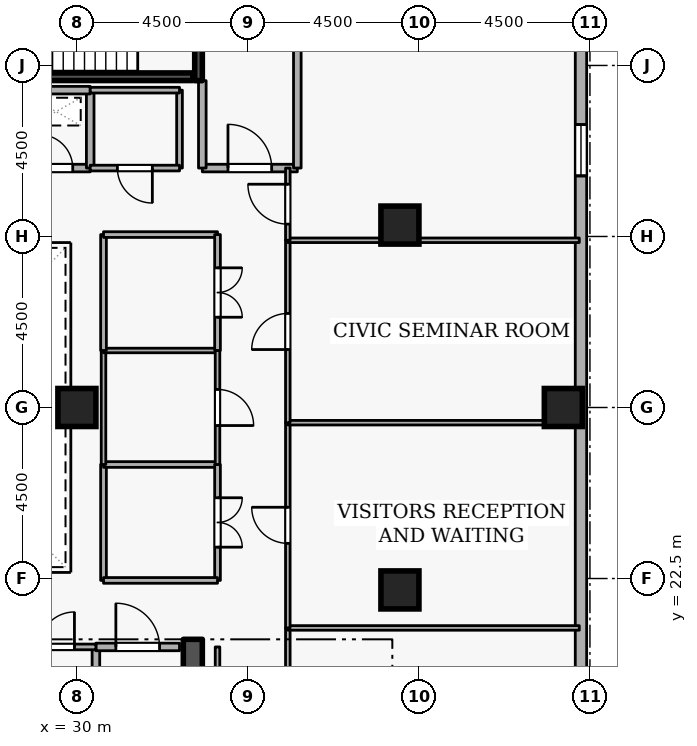
"""IFC4 building model, lengths in metres.
Left out: names, types, materials, properties, quantities, classifications, styles, units other than length and angle.
Written with IfcOpenShell. Run it as: python <this file> out.ifc"""

import sys

from ifc_helpers import new_model, si_unit, direction, frame, frame_2d, origin, origin_2d, place, context, subcontext, project, spatial, rectangle, extrude, element, fill, save


model = new_model("IFC4")
c1 = context("Model", 3, precision=1e-05, world=origin(), true_north=direction((0.0, 1.0)))
c2 = subcontext(c1, "Body", "Model", "MODEL_VIEW")
j1 = project(units=[si_unit("LENGTHUNIT", "METRE"), si_unit("PLANEANGLEUNIT", "RADIAN")], contexts=[c1])
p1 = place(None, origin())
s1 = spatial("IfcSite", under=j1, at=p1, CompositionType="ELEMENT")
p2 = place(p1, origin())
s2 = spatial("IfcBuilding", under=s1, at=p2, CompositionType="ELEMENT")
p3 = place(p2, frame((0.0, 0.0, 218.1)))
s3 = spatial("IfcBuildingStorey", under=s2, at=p3, CompositionType="ELEMENT", Elevation=218.1)
p4 = place(p3, frame((33.05, 15.1, 0.0), z_axis=(0.0, 0.0, 1.0), x_axis=(0.0, 1.0, 0.0)))
e1 = element("IfcWall", 1, at=p4, inside=s3, PredefinedType="SHEAR", context=c2, shape_type="SweptSolid", body=[
    extrude(rectangle(XDim=5.8, YDim=0.5, at=frame_2d((2.9, 0.0))), origin(), (0.0, 0.0, 1.0), 3.6),
])
for number, where, z_axis, x_axis in (
    (2, (42.8, 27.0, 0.0), (0.0, 0.0, 1.0), (1.0, 0.0, 0.0)),
    (3, (38.5, 22.2, 0.0), (0.0, 0.0, 1.0), (1.0, 0.0, 0.0)),
    (4, (38.5, 31.8, 0.0), (0.0, 0.0, 1.0), (1.0, 0.0, 0.0)),
    (5, (30.0, 27.0, 0.0), (0.0, 0.0, 1.0), (1.0, 0.0, 0.0)),
):
    element("IfcColumn", number, at=place(p3, frame(where, z_axis=z_axis, x_axis=x_axis)), inside=s3, PredefinedType="COLUMN", context=c2, shape_type="SweptSolid", body=[
        extrude(rectangle(XDim=1.0, YDim=1.0, at=origin_2d()), origin(), (0.0, 0.0, 1.0), 3.6),
    ])
p5 = place(p3, frame((43.264, 12.094, 0.0), z_axis=(0.0, 0.0, 1.0), x_axis=(2.7061402e-05, 0.999999999634, 0.0)))
e6 = element("IfcWall", 6, at=p5, inside=s3, PredefinedType="STANDARD", context=c2, shape_type="SweptSolid", body=[
    extrude(rectangle(XDim=36.087, YDim=0.3, at=frame_2d((18.043, 0.0))), origin(), (0.0, 0.0, 1.0), 2.66),
])
p6 = place(p5, frame((6.6, 0.0, 0.72)))
e7 = element("IfcOpeningElement", 7, at=p6, cuts=e6, PredefinedType="OPENING", context=c2, shape_type="SweptSolid", body=[
    extrude(rectangle(XDim=1.35, YDim=1.05, at=frame_2d((0.675, 0.525))), frame((0.0, 0.16, 0.0), z_axis=(0.0, -1.0, 0.0), x_axis=(1.0, 0.0, 0.0)), (0.0, 0.0, 1.0), 0.32),
])
p7 = place(p5, frame((21.0, 0.0, 0.72)))
e8 = element("IfcOpeningElement", 8, at=p7, cuts=e6, PredefinedType="OPENING", context=c2, shape_type="SweptSolid", body=[
    extrude(rectangle(XDim=1.35, YDim=1.05, at=frame_2d((0.675, 0.525))), frame((0.0, 0.16, 0.0), z_axis=(0.0, -1.0, 0.0), x_axis=(1.0, 0.0, 0.0)), (0.0, 0.0, 1.0), 0.32),
])
p8 = place(p5, frame((30.6, 0.0, 0.72)))
e9 = element("IfcOpeningElement", 9, at=p8, cuts=e6, PredefinedType="OPENING", context=c2, shape_type="SweptSolid", body=[
    extrude(rectangle(XDim=1.35, YDim=1.05, at=frame_2d((0.675, 0.525))), frame((0.0, 0.16, 0.0), z_axis=(0.0, -1.0, 0.0), x_axis=(1.0, 0.0, 0.0)), (0.0, 0.0, 1.0), 0.32),
])
p9 = place(p3, frame((33.2, 38.95, 0.0), z_axis=(0.0, 0.0, 1.0), x_axis=(0.0, -1.0, 0.0)))
e10 = element("IfcWall", 10, at=p9, inside=s3, PredefinedType="SHEAR", context=c2, shape_type="SweptSolid", body=[
    extrude(rectangle(XDim=3.35, YDim=0.2, at=frame_2d((1.675, 0.0))), origin(), (0.0, 0.0, 1.0), 3.6),
])
p10 = place(p9, frame((1.125, 0.0, 0.0)))
e11 = element("IfcOpeningElement", 11, at=p10, cuts=e10, PredefinedType="OPENING", context=c2, shape_type="SweptSolid", body=[
    extrude(rectangle(XDim=1.1, YDim=2.1, at=frame_2d((0.55, 1.05))), frame((0.0, 0.11, 0.0), z_axis=(0.0, -1.0, 0.0), x_axis=(1.0, 0.0, 0.0)), (0.0, 0.0, 1.0), 0.22),
])
p11 = place(p3, frame((25.95, 35.703, 0.0), z_axis=(0.0, 0.0, 1.0), x_axis=(1.0, 0.0, 0.0)))
e12 = element("IfcWall", 12, at=p11, inside=s3, PredefinedType="SHEAR", context=c2, shape_type="SweptSolid", body=[
    extrude(rectangle(XDim=7.1, YDim=0.2, at=frame_2d((3.55, 0.0))), origin(), (0.0, 0.0, 1.0), 3.6),
])
p12 = place(p3, frame((33.3, 33.3, 0.0), z_axis=(0.0, 0.0, 1.0), x_axis=(1.0, 0.0, 0.0)))
e13 = element("IfcWall", 13, at=p12, inside=s3, PredefinedType="STANDARD", context=c2, shape_type="SweptSolid", body=[
    extrude(rectangle(XDim=2.5, YDim=0.2, at=frame_2d((1.25, 0.0))), origin(), (0.0, 0.0, 1.0), 3.26),
])
p13 = place(p12, frame((0.675, 0.0, 0.0)))
e14 = element("IfcOpeningElement", 14, at=p13, cuts=e13, PredefinedType="OPENING", context=c2, shape_type="SweptSolid", body=[
    extrude(rectangle(XDim=1.15, YDim=2.1, at=frame_2d((0.575, 1.05))), frame((0.0, 0.11, 0.0), z_axis=(0.0, -1.0, 0.0), x_axis=(1.0, 0.0, 0.0)), (0.0, 0.0, 1.0), 0.22),
])
p14 = place(p3, frame((35.8, 33.3, 0.0), z_axis=(0.0, 0.0, 1.0), x_axis=(0.0, 1.0, 0.0)))
e15 = element("IfcWall", 15, at=p14, inside=s3, PredefinedType="STANDARD", context=c2, shape_type="SweptSolid", body=[
    extrude(rectangle(XDim=5.7, YDim=0.2, at=frame_2d((2.85, 0.0))), origin(), (0.0, 0.0, 1.0), 3.26),
])
p15 = place(p3, frame((33.3, 35.6, 0.0), z_axis=(0.0, 0.0, 1.0), x_axis=(0.0, -1.0, 0.0)))
e16 = element("IfcWall", 16, at=p15, inside=s3, PredefinedType="STANDARD", context=c2, shape_type="SweptSolid", body=[
    extrude(rectangle(XDim=2.3, YDim=0.2, at=frame_2d((1.15, 0.0))), origin(), (0.0, 0.0, 1.0), 2.465),
])
p16 = place(p3, frame((28.55, 33.3, 0.0), z_axis=(0.0, 0.0, 1.0), x_axis=(1.0, 0.0, 0.0)))
e17 = element("IfcWall", 17, at=p16, inside=s3, PredefinedType="STANDARD", context=c2, shape_type="SweptSolid", body=[
    extrude(rectangle(XDim=1.8, YDim=0.2, at=frame_2d((0.9, 0.0))), origin(), (0.0, 0.0, 1.0), 3.26),
])
p17 = place(p16, frame((0.46, 0.0, 0.0)))
e18 = element("IfcOpeningElement", 18, at=p17, cuts=e17, PredefinedType="OPENING", context=c2, shape_type="SweptSolid", body=[
    extrude(rectangle(XDim=0.88, YDim=2.04, at=frame_2d((0.44, 1.02))), frame((0.0, 0.11, 0.0), z_axis=(0.0, -1.0, 0.0), x_axis=(1.0, 0.0, 0.0)), (0.0, 0.0, 1.0), 0.22),
])
p18 = place(p3, frame((30.35, 33.3, 0.0), z_axis=(0.0, 0.0, 1.0), x_axis=(0.0, 1.0, 0.0)))
e19 = element("IfcWall", 19, at=p18, inside=s3, PredefinedType="STANDARD", context=c2, shape_type="SweptSolid", body=[
    extrude(rectangle(XDim=2.05, YDim=0.2, at=frame_2d((1.025, 0.0))), origin(), (0.0, 0.0, 1.0), 3.26),
])
p19 = place(p3, frame((30.35, 35.35, 0.0), z_axis=(0.0, 0.0, 1.0), x_axis=(-1.0, 0.0, 0.0)))
e20 = element("IfcWall", 20, at=p19, inside=s3, PredefinedType="STANDARD", context=c2, shape_type="SweptSolid", body=[
    extrude(rectangle(XDim=1.8, YDim=0.2, at=frame_2d((0.9, 0.0))), origin(), (0.0, 0.0, 1.0), 3.26),
])
p20 = place(p3, frame((30.5, 18.65, 0.0), z_axis=(0.0, 0.0, 1.0), x_axis=(0.0, 1.0, 0.0)))
e21 = element("IfcWall", 21, at=p20, inside=s3, PredefinedType="STANDARD", context=c2, shape_type="SweptSolid", body=[
    extrude(rectangle(XDim=2.05, YDim=0.2, at=frame_2d((1.025, 0.0))), origin(), (0.0, 0.0, 1.0), 3.26),
])
p21 = place(p3, frame((30.5, 20.7, 0.0), z_axis=(0.0, 0.0, 1.0), x_axis=(1.0, 0.0, 0.0)))
e22 = element("IfcWall", 22, at=p21, inside=s3, PredefinedType="STANDARD", context=c2, shape_type="SweptSolid", body=[
    extrude(rectangle(XDim=2.2, YDim=0.2, at=frame_2d((1.1, 0.0))), origin(), (0.0, 0.0, 1.0), 3.26),
])
p22 = place(p21, frame((0.525, 0.0, 0.0)))
e23 = element("IfcOpeningElement", 23, at=p22, cuts=e22, PredefinedType="OPENING", context=c2, shape_type="SweptSolid", body=[
    extrude(rectangle(XDim=1.15, YDim=2.1, at=frame_2d((0.575, 1.05))), frame((0.0, 0.11, 0.0), z_axis=(0.0, -1.0, 0.0), x_axis=(1.0, 0.0, 0.0)), (0.0, 0.0, 1.0), 0.22),
])
p23 = place(p3, frame((28.45, 20.7, 0.0), z_axis=(0.0, 0.0, 1.0), x_axis=(1.0, 0.0, 0.0)))
e24 = element("IfcWall", 24, at=p23, inside=s3, PredefinedType="PARTITIONING", context=c2, shape_type="SweptSolid", body=[
    extrude(rectangle(XDim=2.05, YDim=0.15, at=frame_2d((1.025, 0.0))), origin(), (0.0, 0.0, 1.0), 3.26),
])
p24 = place(p23, frame((0.565, 0.0, 0.0)))
e25 = element("IfcOpeningElement", 25, at=p24, cuts=e24, PredefinedType="OPENING", context=c2, shape_type="SweptSolid", body=[
    extrude(rectangle(XDim=0.92, YDim=2.08, at=frame_2d((0.46, 1.04))), frame((0.0, 0.085, 0.0), z_axis=(0.0, -1.0, 0.0), x_axis=(1.0, 0.0, 0.0)), (0.0, 0.0, 1.0), 0.17),
])
p25 = place(p3, frame((32.7, 35.35, 0.0), z_axis=(0.0, 0.0, 1.0), x_axis=(0.0, -1.0, 0.0)))
e26 = element("IfcWall", 26, at=p25, inside=s3, PredefinedType="PARTITIONING", context=c2, shape_type="SweptSolid", body=[
    extrude(rectangle(XDim=2.05, YDim=0.15, at=frame_2d((1.025, 0.0))), origin(), (0.0, 0.0, 1.0), 2.465),
])
p26 = place(p3, frame((32.7, 33.3, 0.0), z_axis=(0.0, 0.0, 1.0), x_axis=(-1.0, 0.0, 0.0)))
e27 = element("IfcWall", 27, at=p26, inside=s3, PredefinedType="PARTITIONING", context=c2, shape_type="SweptSolid", body=[
    extrude(rectangle(XDim=2.35, YDim=0.15, at=frame_2d((1.175, 0.0))), origin(), (0.0, 0.0, 1.0), 3.26),
])
p27 = place(p26, frame((0.715, 0.0, 0.0)))
e28 = element("IfcOpeningElement", 28, at=p27, cuts=e27, PredefinedType="OPENING", context=c2, shape_type="SweptSolid", body=[
    extrude(rectangle(XDim=0.92, YDim=2.08, at=frame_2d((0.46, 1.04))), frame((0.0, 0.085, 0.0), z_axis=(0.0, -1.0, 0.0), x_axis=(1.0, 0.0, 0.0)), (0.0, 0.0, 1.0), 0.17),
])
p28 = place(p3, frame((30.35, 35.35, 0.0), z_axis=(0.0, 0.0, 1.0), x_axis=(1.0, 0.0, 0.0)))
e29 = element("IfcWall", 29, at=p28, inside=s3, PredefinedType="PARTITIONING", context=c2, shape_type="SweptSolid", body=[
    extrude(rectangle(XDim=2.35, YDim=0.15, at=frame_2d((1.175, 0.0))), origin(), (0.0, 0.0, 1.0), 3.26),
])
p29 = place(p3, frame((33.7, 20.7, 0.0), z_axis=(0.0, 0.0, 1.0), x_axis=(0.0, -1.0, 0.0)))
e30 = element("IfcWall", 30, at=p29, inside=s3, PredefinedType="PARTITIONING", context=c2, shape_type="SweptSolid", body=[
    extrude(rectangle(XDim=5.9, YDim=0.12, at=frame_2d((2.95, 0.0))), origin(), (0.0, 0.0, 1.0), 3.26),
])
p30 = place(p3, frame((35.55, 14.8, 0.0), z_axis=(0.0, 0.0, 1.0), x_axis=(0.0, 1.0, 0.0)))
e31 = element("IfcWall", 31, at=p30, inside=s3, PredefinedType="PARTITIONING", context=c2, shape_type="SweptSolid", body=[
    extrude(rectangle(XDim=6.4, YDim=0.12, at=frame_2d((3.2, 0.0))), origin(), (0.0, 0.0, 1.0), 3.26),
])
p31 = place(p30, frame((2.675, 0.0, 0.0)))
e32 = element("IfcOpeningElement", 32, at=p31, cuts=e31, PredefinedType="OPENING", context=c2, shape_type="SweptSolid", body=[
    extrude(rectangle(XDim=1.05, YDim=2.1, at=frame_2d((0.525, 1.05))), frame((0.0, 0.07, 0.0), z_axis=(0.0, -1.0, 0.0), x_axis=(1.0, 0.0, 0.0)), (0.0, 0.0, 1.0), 0.14),
])
p32 = place(p3, frame((35.55, 21.2, 0.0), z_axis=(0.0, 0.0, 1.0), x_axis=(1.0, 0.0, 0.0)))
e33 = element("IfcWall", 33, at=p32, inside=s3, PredefinedType="PARTITIONING", context=c2, shape_type="SweptSolid", body=[
    extrude(rectangle(XDim=7.67, YDim=0.12, at=frame_2d((3.835, 0.0))), origin(), (0.0, 0.0, 1.0), 3.26),
])
p33 = place(p3, frame((35.55, 21.2, 0.0), z_axis=(0.0, 0.0, 1.0), x_axis=(0.0, 1.0, 0.0)))
e34 = element("IfcWall", 34, at=p33, inside=s3, PredefinedType="PARTITIONING", context=c2, shape_type="SweptSolid", body=[
    extrude(rectangle(XDim=5.4, YDim=0.12, at=frame_2d((2.7, 0.0))), origin(), (0.0, 0.0, 1.0), 3.26),
])
p34 = place(p33, frame((2.225, 0.0, 0.0)))
e35 = element("IfcOpeningElement", 35, at=p34, cuts=e34, PredefinedType="OPENING", context=c2, shape_type="SweptSolid", body=[
    extrude(rectangle(XDim=0.95, YDim=2.1, at=frame_2d((0.475, 1.05))), frame((0.0, 0.07, 0.0), z_axis=(0.0, -1.0, 0.0), x_axis=(1.0, 0.0, 0.0)), (0.0, 0.0, 1.0), 0.14),
])
p35 = place(p3, frame((35.55, 26.6, 0.0), z_axis=(0.0, 0.0, 1.0), x_axis=(1.0, 0.0, 0.0)))
e36 = element("IfcWall", 36, at=p35, inside=s3, PredefinedType="PARTITIONING", context=c2, shape_type="SweptSolid", body=[
    extrude(rectangle(XDim=7.67, YDim=0.12, at=frame_2d((3.835, 0.0))), origin(), (0.0, 0.0, 1.0), 3.26),
])
p36 = place(p3, frame((35.55, 26.6, 0.0), z_axis=(0.0, 0.0, 1.0), x_axis=(0.0, 1.0, 0.0)))
e37 = element("IfcWall", 37, at=p36, inside=s3, PredefinedType="PARTITIONING", context=c2, shape_type="SweptSolid", body=[
    extrude(rectangle(XDim=4.8, YDim=0.12, at=frame_2d((2.4, 0.0))), origin(), (0.0, 0.0, 1.0), 3.26),
])
p37 = place(p36, frame((1.925, 0.0, 0.0)))
e38 = element("IfcOpeningElement", 38, at=p37, cuts=e37, PredefinedType="OPENING", context=c2, shape_type="SweptSolid", body=[
    extrude(rectangle(XDim=0.95, YDim=2.1, at=frame_2d((0.475, 1.05))), frame((0.0, 0.07, 0.0), z_axis=(0.0, -1.0, 0.0), x_axis=(1.0, 0.0, 0.0)), (0.0, 0.0, 1.0), 0.14),
])
p38 = place(p3, frame((35.55, 31.4, 0.0), z_axis=(0.0, 0.0, 1.0), x_axis=(1.0, 0.0, 0.0)))
e39 = element("IfcWall", 39, at=p38, inside=s3, PredefinedType="PARTITIONING", context=c2, shape_type="SweptSolid", body=[
    extrude(rectangle(XDim=7.67, YDim=0.12, at=frame_2d((3.835, 0.0))), origin(), (0.0, 0.0, 1.0), 3.26),
])
p39 = place(p3, frame((35.55, 31.4, 0.0), z_axis=(0.0, 0.0, 1.0), x_axis=(0.0, 1.0, 0.0)))
e40 = element("IfcWall", 40, at=p39, inside=s3, PredefinedType="PARTITIONING", context=c2, shape_type="SweptSolid", body=[
    extrude(rectangle(XDim=1.9, YDim=0.12, at=frame_2d((0.95, 0.0))), origin(), (0.0, 0.0, 1.0), 3.26),
])
p40 = place(p39, frame((0.425, 0.0, 0.0)))
e41 = element("IfcOpeningElement", 41, at=p40, cuts=e40, PredefinedType="OPENING", context=c2, shape_type="SweptSolid", body=[
    extrude(rectangle(XDim=1.05, YDim=2.1, at=frame_2d((0.525, 1.05))), frame((0.0, 0.07, 0.0), z_axis=(0.0, -1.0, 0.0), x_axis=(1.0, 0.0, 0.0)), (0.0, 0.0, 1.0), 0.14),
])
p41 = place(p3, frame((30.7, 22.45, 0.0), z_axis=(0.0, 0.0, 1.0), x_axis=(0.0, 1.0, 0.0)))
e42 = element("IfcWall", 42, at=p41, inside=s3, PredefinedType="PARTITIONING", context=c2, shape_type="SweptSolid", body=[
    extrude(rectangle(XDim=3.05, YDim=0.15, at=frame_2d((1.525, 0.0))), origin(), (0.0, 0.0, 1.0), 3.26),
])
p42 = place(p3, frame((30.7, 25.5, 0.0), z_axis=(0.0, 0.0, 1.0), x_axis=(1.0, 0.0, 0.0)))
e43 = element("IfcWall", 43, at=p42, inside=s3, PredefinedType="PARTITIONING", context=c2, shape_type="SweptSolid", body=[
    extrude(rectangle(XDim=3.0, YDim=0.15, at=frame_2d((1.5, 0.0))), origin(), (0.0, 0.0, 1.0), 3.26),
])
p43 = place(p3, frame((33.7, 25.5, 0.0), z_axis=(0.0, 0.0, 1.0), x_axis=(0.0, -1.0, 0.0)))
e44 = element("IfcWall", 44, at=p43, inside=s3, PredefinedType="PARTITIONING", context=c2, shape_type="SweptSolid", body=[
    extrude(rectangle(XDim=3.05, YDim=0.15, at=frame_2d((1.525, 0.0))), origin(), (0.0, 0.0, 1.0), 3.26),
])
p44 = place(p43, frame((0.875, 0.0, 0.0)))
e45 = element("IfcOpeningElement", 45, at=p44, cuts=e44, PredefinedType="OPENING", context=c2, shape_type="SweptSolid", body=[
    extrude(rectangle(XDim=1.3, YDim=2.12, at=frame_2d((0.65, 1.06))), frame((0.0, 0.085, 0.0), z_axis=(0.0, -1.0, 0.0), x_axis=(1.0, 0.0, 0.0)), (0.0, 0.0, 1.0), 0.17),
])
p45 = place(p3, frame((33.7, 22.45, 0.0), z_axis=(0.0, 0.0, 1.0), x_axis=(-1.0, 0.0, 0.0)))
e46 = element("IfcWall", 46, at=p45, inside=s3, PredefinedType="PARTITIONING", context=c2, shape_type="SweptSolid", body=[
    extrude(rectangle(XDim=3.0, YDim=0.15, at=frame_2d((1.5, 0.0))), origin(), (0.0, 0.0, 1.0), 3.26),
])
for number, where, z_axis, x_axis in (
    (47, (30.7, 25.5, 0.0), (0.0, 0.0, 1.0), (0.0, 1.0, 0.0)),
    (48, (30.7, 28.5, 0.0), (0.0, 0.0, 1.0), (1.0, 0.0, 0.0)),
):
    element("IfcWall", number, at=place(p3, frame(where, z_axis=z_axis, x_axis=x_axis)), inside=s3, PredefinedType="PARTITIONING", context=c2, shape_type="SweptSolid", body=[
        extrude(rectangle(XDim=3.0, YDim=0.12, at=frame_2d((1.5, 0.0))), origin(), (0.0, 0.0, 1.0), 3.26),
    ])
p46 = place(p3, frame((33.7, 28.5, 0.0), z_axis=(0.0, 0.0, 1.0), x_axis=(0.0, -1.0, 0.0)))
e49 = element("IfcWall", 49, at=p46, inside=s3, PredefinedType="PARTITIONING", context=c2, shape_type="SweptSolid", body=[
    extrude(rectangle(XDim=3.0, YDim=0.12, at=frame_2d((1.5, 0.0))), origin(), (0.0, 0.0, 1.0), 3.26),
])
p47 = place(p46, frame((1.025, 0.0, 0.0)))
e50 = element("IfcOpeningElement", 50, at=p47, cuts=e49, PredefinedType="OPENING", context=c2, shape_type="SweptSolid", body=[
    extrude(rectangle(XDim=0.95, YDim=2.1, at=frame_2d((0.475, 1.05))), frame((0.0, 0.07, 0.0), z_axis=(0.0, -1.0, 0.0), x_axis=(1.0, 0.0, 0.0)), (0.0, 0.0, 1.0), 0.14),
])
p48 = place(p3, frame((30.7, 28.5, 0.0), z_axis=(0.0, 0.0, 1.0), x_axis=(0.0, 1.0, 0.0)))
e51 = element("IfcWall", 51, at=p48, inside=s3, PredefinedType="PARTITIONING", context=c2, shape_type="SweptSolid", body=[
    extrude(rectangle(XDim=3.05, YDim=0.15, at=frame_2d((1.525, 0.0))), origin(), (0.0, 0.0, 1.0), 3.26),
])
p49 = place(p3, frame((30.7, 31.55, 0.0), z_axis=(0.0, 0.0, 1.0), x_axis=(1.0, 0.0, 0.0)))
e52 = element("IfcWall", 52, at=p49, inside=s3, PredefinedType="PARTITIONING", context=c2, shape_type="SweptSolid", body=[
    extrude(rectangle(XDim=3.0, YDim=0.15, at=frame_2d((1.5, 0.0))), origin(), (0.0, 0.0, 1.0), 3.26),
])
p50 = place(p3, frame((33.7, 31.55, 0.0), z_axis=(0.0, 0.0, 1.0), x_axis=(0.0, -1.0, 0.0)))
e53 = element("IfcWall", 53, at=p50, inside=s3, PredefinedType="PARTITIONING", context=c2, shape_type="SweptSolid", body=[
    extrude(rectangle(XDim=3.05, YDim=0.15, at=frame_2d((1.525, 0.0))), origin(), (0.0, 0.0, 1.0), 3.26),
])
p51 = place(p50, frame((0.875, 0.0, 0.0)))
e54 = element("IfcOpeningElement", 54, at=p51, cuts=e53, PredefinedType="OPENING", context=c2, shape_type="SweptSolid", body=[
    extrude(rectangle(XDim=1.3, YDim=2.12, at=frame_2d((0.65, 1.06))), frame((0.0, 0.085, 0.0), z_axis=(0.0, -1.0, 0.0), x_axis=(1.0, 0.0, 0.0)), (0.0, 0.0, 1.0), 0.17),
])
p52 = place(p7, origin())
e55 = element("IfcWindow", 55, at=p52, inside=s3, PartitioningType="SINGLE_PANEL", PredefinedType="WINDOW", context=c2, shape_type="SweptSolid", body=[
    extrude(rectangle(XDim=1.35, YDim=1.05, at=frame_2d((0.675, 0.525))), frame((0.0, 0.03, 0.0), z_axis=(0.0, -1.0, 0.0), x_axis=(1.0, 0.0, 0.0)), (0.0, 0.0, 1.0), 0.06),
])
fill(e8, e55)
p53 = place(p13, origin())
e56 = element("IfcDoor", 56, at=p53, inside=s3, OperationType="SINGLE_SWING_LEFT", PredefinedType="DOOR", context=c2, shape_type="SweptSolid", body=[
    extrude(rectangle(XDim=1.15, YDim=2.1, at=frame_2d((0.575, 1.05))), frame((0.0, 0.025, 0.0), z_axis=(0.0, -1.0, 0.0), x_axis=(1.0, 0.0, 0.0)), (0.0, 0.0, 1.0), 0.05),
])
fill(e14, e56)
p54 = place(p17, origin())
e57 = element("IfcDoor", 57, at=p54, inside=s3, OperationType="SINGLE_SWING_LEFT", PredefinedType="DOOR", context=c2, shape_type="SweptSolid", body=[
    extrude(rectangle(XDim=0.88, YDim=2.04, at=frame_2d((0.44, 1.02))), frame((0.0, 0.025, 0.0), z_axis=(0.0, -1.0, 0.0), x_axis=(1.0, 0.0, 0.0)), (0.0, 0.0, 1.0), 0.05),
])
fill(e18, e57)
p55 = place(p24, origin())
e58 = element("IfcDoor", 58, at=p55, inside=s3, OperationType="SINGLE_SWING_RIGHT", PredefinedType="DOOR", context=c2, shape_type="SweptSolid", body=[
    extrude(rectangle(XDim=0.92, YDim=2.08, at=frame_2d((0.46, 1.04))), frame((0.0, 0.025, 0.0), z_axis=(0.0, -1.0, 0.0), x_axis=(1.0, 0.0, 0.0)), (0.0, 0.0, 1.0), 0.05),
])
fill(e25, e58)
p56 = place(p22, origin())
e59 = element("IfcDoor", 59, at=p56, inside=s3, OperationType="SINGLE_SWING_LEFT", PredefinedType="DOOR", context=c2, shape_type="SweptSolid", body=[
    extrude(rectangle(XDim=1.15, YDim=2.1, at=frame_2d((0.575, 1.05))), frame((0.0, 0.025, 0.0), z_axis=(0.0, -1.0, 0.0), x_axis=(1.0, 0.0, 0.0)), (0.0, 0.0, 1.0), 0.05),
])
fill(e23, e59)
p57 = place(p27, origin())
e60 = element("IfcDoor", 60, at=p57, inside=s3, OperationType="SINGLE_SWING_LEFT", PredefinedType="DOOR", context=c2, shape_type="SweptSolid", body=[
    extrude(rectangle(XDim=0.92, YDim=2.08, at=frame_2d((0.46, 1.04))), frame((0.0, 0.025, 0.0), z_axis=(0.0, -1.0, 0.0), x_axis=(1.0, 0.0, 0.0)), (0.0, 0.0, 1.0), 0.05),
])
fill(e28, e60)
p58 = place(p34, origin())
e61 = element("IfcDoor", 61, at=p58, inside=s3, OperationType="SINGLE_SWING_RIGHT", PredefinedType="DOOR", context=c2, shape_type="SweptSolid", body=[
    extrude(rectangle(XDim=0.95, YDim=2.1, at=frame_2d((0.475, 1.05))), frame((0.0, 0.025, 0.0), z_axis=(0.0, -1.0, 0.0), x_axis=(1.0, 0.0, 0.0)), (0.0, 0.0, 1.0), 0.05),
])
fill(e35, e61)
p59 = place(p37, origin())
e62 = element("IfcDoor", 62, at=p59, inside=s3, OperationType="SINGLE_SWING_LEFT", PredefinedType="DOOR", context=c2, shape_type="SweptSolid", body=[
    extrude(rectangle(XDim=0.95, YDim=2.1, at=frame_2d((0.475, 1.05))), frame((0.0, 0.025, 0.0), z_axis=(0.0, -1.0, 0.0), x_axis=(1.0, 0.0, 0.0)), (0.0, 0.0, 1.0), 0.05),
])
fill(e38, e62)
p60 = place(p40, origin())
e63 = element("IfcDoor", 63, at=p60, inside=s3, OperationType="SINGLE_SWING_RIGHT", PredefinedType="DOOR", context=c2, shape_type="SweptSolid", body=[
    extrude(rectangle(XDim=1.05, YDim=2.1, at=frame_2d((0.525, 1.05))), frame((0.0, 0.025, 0.0), z_axis=(0.0, -1.0, 0.0), x_axis=(1.0, 0.0, 0.0)), (0.0, 0.0, 1.0), 0.05),
])
fill(e41, e63)
p61 = place(p44, origin())
e64 = element("IfcDoor", 64, at=p61, inside=s3, OperationType="DOUBLE_DOOR_SINGLE_SWING", PredefinedType="DOOR", context=c2, shape_type="SweptSolid", body=[
    extrude(rectangle(XDim=1.3, YDim=2.12, at=frame_2d((0.65, 1.06))), frame((0.0, 0.025, 0.0), z_axis=(0.0, -1.0, 0.0), x_axis=(1.0, 0.0, 0.0)), (0.0, 0.0, 1.0), 0.05),
])
fill(e45, e64)
p62 = place(p47, origin())
e65 = element("IfcDoor", 65, at=p62, inside=s3, OperationType="SINGLE_SWING_RIGHT", PredefinedType="DOOR", context=c2, shape_type="SweptSolid", body=[
    extrude(rectangle(XDim=0.95, YDim=2.1, at=frame_2d((0.475, 1.05))), frame((0.0, 0.025, 0.0), z_axis=(0.0, -1.0, 0.0), x_axis=(1.0, 0.0, 0.0)), (0.0, 0.0, 1.0), 0.05),
])
fill(e50, e65)
p63 = place(p51, origin())
e66 = element("IfcDoor", 66, at=p63, inside=s3, OperationType="DOUBLE_DOOR_SINGLE_SWING", PredefinedType="DOOR", context=c2, shape_type="SweptSolid", body=[
    extrude(rectangle(XDim=1.3, YDim=2.12, at=frame_2d((0.65, 1.06))), frame((0.0, 0.025, 0.0), z_axis=(0.0, -1.0, 0.0), x_axis=(1.0, 0.0, 0.0)), (0.0, 0.0, 1.0), 0.05),
])
fill(e54, e66)
save(model, sys.argv[1])
